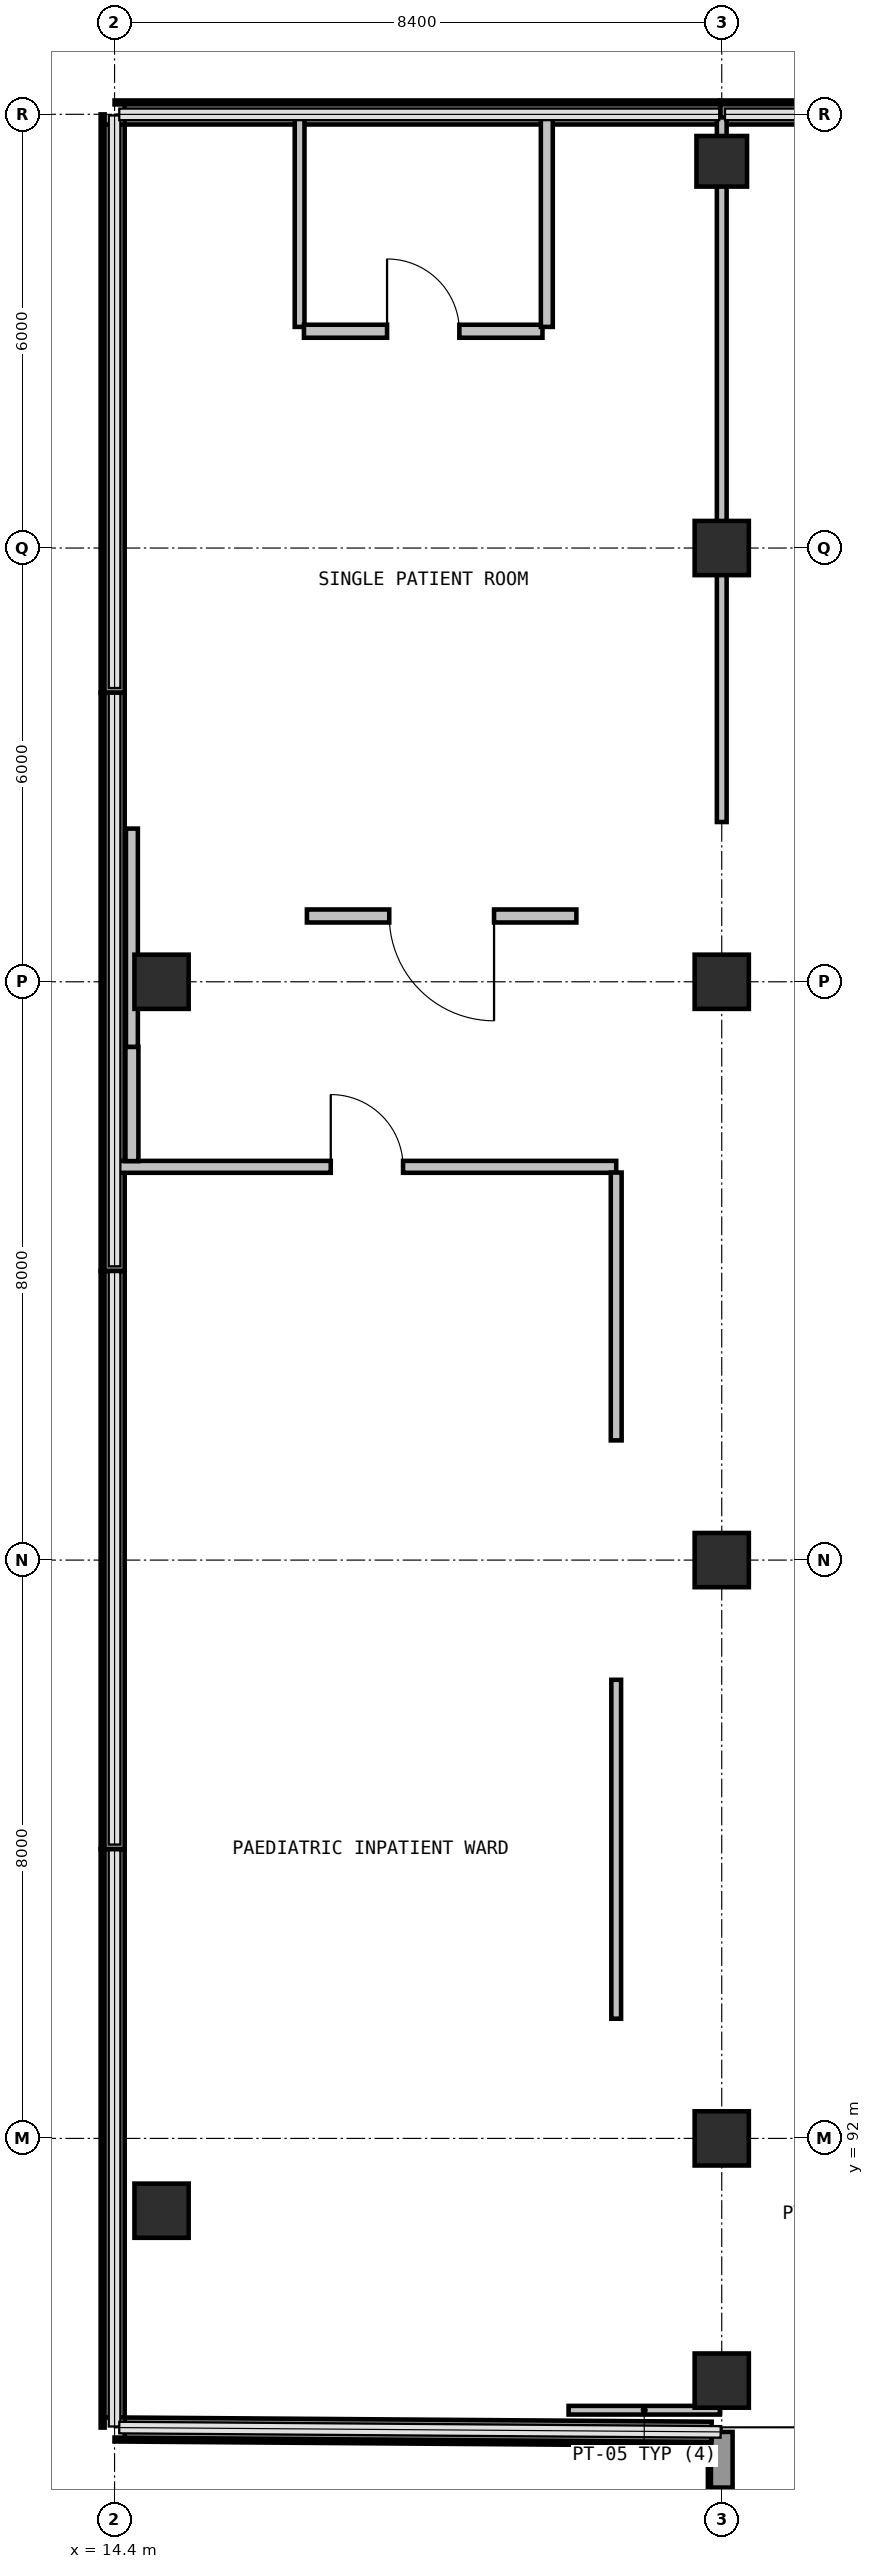
"""IFC4 building model, lengths in metres.
Left out: names, types, materials, properties, quantities, classifications, styles, units other than length and angle.
Written with IfcOpenShell. Run it as: python <this file> out.ifc"""

import sys

from ifc_helpers import new_model, si_unit, direction, frame, frame_2d, origin, origin_2d, place, context, subcontext, project, spatial, rectangle, extrude, element, fill, save


model = new_model("IFC4")
c1 = context("Model", 3, precision=1e-05, world=origin(), true_north=direction((0.0, 1.0)))
c2 = subcontext(c1, "Body", "Model", "MODEL_VIEW")
j1 = project(units=[si_unit("LENGTHUNIT", "METRE"), si_unit("PLANEANGLEUNIT", "RADIAN")], contexts=[c1])
p1 = place(None, origin())
s1 = spatial("IfcSite", under=j1, at=p1, CompositionType="ELEMENT")
p2 = place(p1, origin())
s2 = spatial("IfcBuilding", under=s1, at=p2, CompositionType="ELEMENT")
p3 = place(p2, frame((0.0, 0.0, 19.2)))
s3 = spatial("IfcBuildingStorey", under=s2, at=p3, CompositionType="ELEMENT", Elevation=19.2)
for number, where, z_axis, x_axis in (
    (1, (15.05, 91.0, 0.0), (0.0, 0.0, 1.0), (1.0, 0.0, 0.0)),
    (2, (15.05, 108.0, 0.0), (0.0, 0.0, 1.0), (1.0, 0.0, 0.0)),
):
    element("IfcColumn", number, at=place(p3, frame(where, z_axis=z_axis, x_axis=x_axis)), inside=s3, PredefinedType="COLUMN", context=c2, shape_type="SweptSolid", body=[
        extrude(rectangle(XDim=0.75, YDim=0.75, at=origin_2d()), origin(), (0.0, 0.0, 1.0), 3.768),
    ])
for number, where, z_axis, x_axis in (
    (3, (22.8, 88.65, 0.0), (0.0, 0.0, 1.0), (1.0, 0.0, 0.0)),
    (4, (22.8, 92.0, 0.0), (0.0, 0.0, 1.0), (1.0, 0.0, 0.0)),
    (5, (22.8, 100.0, 0.0), (0.0, 0.0, 1.0), (1.0, 0.0, 0.0)),
    (6, (22.8, 108.0, 0.0), (0.0, 0.0, 1.0), (1.0, 0.0, 0.0)),
    (7, (22.8, 114.0, 0.0), (0.0, 0.0, 1.0), (1.0, 0.0, 0.0)),
):
    element("IfcColumn", number, at=place(p3, frame(where, z_axis=z_axis, x_axis=x_axis)), inside=s3, PredefinedType="COLUMN", context=c2, shape_type="SweptSolid", body=[
        extrude(rectangle(XDim=0.75, YDim=0.75, at=origin_2d()), origin(), (0.0, 0.0, 1.0), 3.77),
    ])
p4 = place(p3, frame((22.8, 119.35, 0.0), z_axis=(0.0, 0.0, 1.0), x_axis=(1.0, 0.0, 0.0)))
e8 = element("IfcColumn", 8, at=p4, inside=s3, PredefinedType="COLUMN", context=c2, shape_type="SweptSolid", body=[
    extrude(rectangle(XDim=0.7, YDim=0.7, at=origin_2d()), origin(), (0.0, 0.0, 1.0), 3.77),
])
p5 = place(p3, frame((14.4, 88.14, 0.0), z_axis=(0.0, 0.0, 1.0), x_axis=(0.0, 1.0, 0.0)))
e9 = element("IfcWall", 9, at=p5, inside=s3, PredefinedType="SOLIDWALL", context=c2, shape_type="SweptSolid", body=[
    extrude(rectangle(XDim=7.858, YDim=0.28, at=frame_2d((3.929, 0.0))), origin(), (0.0, 0.0, 1.0), 0.94),
])
p6 = place(p3, frame((14.4, 96.002, 0.0), z_axis=(0.0, 0.0, 1.0), x_axis=(0.0, 1.0, 0.0)))
e10 = element("IfcWall", 10, at=p6, inside=s3, PredefinedType="SOLIDWALL", context=c2, shape_type="SweptSolid", body=[
    extrude(rectangle(XDim=7.995, YDim=0.28, at=frame_2d((3.998, 0.0))), origin(), (0.0, 0.0, 1.0), 0.94),
])
p7 = place(p3, frame((14.4, 104.001, 0.0), z_axis=(0.0, 0.0, 1.0), x_axis=(0.0, 1.0, 0.0)))
e11 = element("IfcWall", 11, at=p7, inside=s3, PredefinedType="SOLIDWALL", context=c2, shape_type="SweptSolid", body=[
    extrude(rectangle(XDim=7.996, YDim=0.28, at=frame_2d((3.998, 0.0))), origin(), (0.0, 0.0, 1.0), 0.94),
])
p8 = place(p3, frame((14.4, 112.001, 0.0), z_axis=(0.0, 0.0, 1.0), x_axis=(0.0, 1.0, 0.0)))
e12 = element("IfcWall", 12, at=p8, inside=s3, PredefinedType="SOLIDWALL", context=c2, shape_type="SweptSolid", body=[
    extrude(rectangle(XDim=7.858, YDim=0.28, at=frame_2d((3.929, 0.0))), origin(), (0.0, 0.0, 1.0), 0.94),
])
p9 = place(p3, frame((14.54, 119.999, 0.0), z_axis=(0.0, 0.0, 1.0), x_axis=(1.0, 0.0, 0.0)))
e13 = element("IfcWall", 13, at=p9, inside=s3, PredefinedType="SOLIDWALL", context=c2, shape_type="SweptSolid", body=[
    extrude(rectangle(XDim=8.238, YDim=0.28, at=frame_2d((4.119, 0.0))), origin(), (0.0, 0.0, 1.0), 0.94),
])
p10 = place(p3, frame((22.782, 119.999, 0.0), z_axis=(0.0, 0.0, 1.0), x_axis=(1.0, 0.0, 0.0)))
e14 = element("IfcWall", 14, at=p10, inside=s3, PredefinedType="SOLIDWALL", context=c2, shape_type="SweptSolid", body=[
    extrude(rectangle(XDim=8.376, YDim=0.28, at=frame_2d((4.188, 0.0))), origin(), (0.0, 0.0, 1.0), 0.94),
])
p11 = place(p3, frame((22.801, 84.0, 0.0), z_axis=(0.0, 0.0, 1.0), x_axis=(-0.000247862181, 0.999999969282, 0.0)))
e15 = element("IfcWall", 15, at=p11, inside=s3, PredefinedType="SOLIDWALL", context=c2, shape_type="SweptSolid", body=[
    extrude(rectangle(XDim=3.94, YDim=0.3, at=frame_2d((1.97, 0.0))), origin(), (0.0, 0.0, 1.0), 3.77),
])
p12 = place(p11, frame((0.77, 0.0, 0.96)))
e16 = element("IfcOpeningElement", 16, at=p12, cuts=e15, PredefinedType="OPENING", context=c2, shape_type="SweptSolid", body=[
    extrude(rectangle(XDim=2.4, YDim=1.5, at=frame_2d((1.2, 0.75))), frame((0.0, 0.16, 0.0), z_axis=(0.0, -1.0, 0.0), x_axis=(1.0, 0.0, 0.0)), (0.0, 0.0, 1.0), 0.32),
])
p13 = place(p3, frame((22.66, 87.941, 0.0), z_axis=(0.0, 0.0, 1.0), x_axis=(-0.999974397117, 0.007155774573, 0.0)))
e17 = element("IfcWall", 17, at=p13, inside=s3, PredefinedType="SOLIDWALL", context=c2, shape_type="SweptSolid", body=[
    extrude(rectangle(XDim=8.12, YDim=0.28, at=frame_2d((4.06, 0.0))), origin(), (0.0, 0.0, 1.0), 0.94),
])
p14 = place(p3, frame((14.442, 105.44, 0.0), z_axis=(0.0, 0.0, 1.0), x_axis=(1.0, 0.0, 0.0)))
e18 = element("IfcWall", 18, at=p14, inside=s3, PredefinedType="PARTITIONING", context=c2, shape_type="SweptSolid", body=[
    extrude(rectangle(XDim=6.898, YDim=0.165, at=frame_2d((3.449, 0.0))), origin(), (0.0, 0.0, 1.0), 3.77),
])
p15 = place(p14, frame((2.949, 0.0, 0.0)))
e19 = element("IfcOpeningElement", 19, at=p15, cuts=e18, PredefinedType="OPENING", context=c2, shape_type="SweptSolid", body=[
    extrude(rectangle(XDim=1.0, YDim=2.15, at=frame_2d((0.5, 1.075))), frame((0.0, 0.093, 0.0), z_axis=(0.0, -1.0, 0.0), x_axis=(1.0, 0.0, 0.0)), (0.0, 0.0, 1.0), 0.185),
])
p16 = place(p3, frame((21.34, 105.361, 0.0), z_axis=(0.0, 0.0, 1.0), x_axis=(0.0, -1.0, 0.0)))
e20 = element("IfcWall", 20, at=p16, inside=s3, PredefinedType="PARTITIONING", context=c2, shape_type="SweptSolid", body=[
    extrude(rectangle(XDim=3.705, YDim=0.15, at=frame_2d((1.853, 0.0))), origin(), (0.0, 0.0, 1.0), 3.77),
])
p17 = place(p3, frame((21.34, 98.344, 0.0), z_axis=(0.0, 0.0, 1.0), x_axis=(0.0, -1.0, 0.0)))
e21 = element("IfcWall", 21, at=p17, inside=s3, PredefinedType="PARTITIONING", context=c2, shape_type="SweptSolid", body=[
    extrude(rectangle(XDim=4.688, YDim=0.135, at=frame_2d((2.344, 0.0))), origin(), (0.0, 0.0, 1.0), 3.77),
])
p18 = place(p3, frame((20.681, 88.24, 0.0), z_axis=(0.0, 0.0, 1.0), x_axis=(1.0, 0.0, 0.0)))
e22 = element("IfcWall", 22, at=p18, inside=s3, PredefinedType="PARTITIONING", context=c2, shape_type="SweptSolid", body=[
    extrude(rectangle(XDim=2.093, YDim=0.12, at=frame_2d((1.046, 0.0))), origin(), (0.0, 0.0, 1.0), 3.77),
])
p19 = place(p3, frame((14.64, 107.1, 0.0), z_axis=(0.0, 0.0, 1.0), x_axis=(0.0, -1.0, 0.0)))
e23 = element("IfcWall", 23, at=p19, inside=s3, PredefinedType="PARTITIONING", context=c2, shape_type="SweptSolid", body=[
    extrude(rectangle(XDim=1.581, YDim=0.18, at=frame_2d((0.791, 0.0))), origin(), (0.0, 0.0, 1.0), 3.77),
])
p20 = place(p3, frame((20.789, 108.91, 0.0), z_axis=(0.0, 0.0, 1.0), x_axis=(-1.0, 0.0, 0.0)))
e24 = element("IfcWall", 24, at=p20, inside=s3, PredefinedType="PARTITIONING", context=c2, shape_type="SweptSolid", body=[
    extrude(rectangle(XDim=3.728, YDim=0.18, at=frame_2d((1.864, 0.0))), origin(), (0.0, 0.0, 1.0), 3.77),
])
p21 = place(p20, frame((1.139, 0.0, 0.0)))
e25 = element("IfcOpeningElement", 25, at=p21, cuts=e24, PredefinedType="OPENING", context=c2, shape_type="SweptSolid", body=[
    extrude(rectangle(XDim=1.45, YDim=2.15, at=frame_2d((0.725, 1.075))), frame((0.0, 0.1, 0.0), z_axis=(0.0, -1.0, 0.0), x_axis=(1.0, 0.0, 0.0)), (0.0, 0.0, 1.0), 0.2),
])
p22 = place(p3, frame((14.64, 110.119, 0.0), z_axis=(0.0, 0.0, 1.0), x_axis=(0.0, -1.0, 0.0)))
e26 = element("IfcWall", 26, at=p22, inside=s3, PredefinedType="PARTITIONING", context=c2, shape_type="SweptSolid", body=[
    extrude(rectangle(XDim=3.019, YDim=0.165, at=frame_2d((1.509, 0.0))), origin(), (0.0, 0.0, 1.0), 3.77),
])
p23 = place(p3, frame((16.96, 119.957, 0.0), z_axis=(0.0, 0.0, 1.0), x_axis=(0.0, -1.0, 0.0)))
e27 = element("IfcWall", 27, at=p23, inside=s3, PredefinedType="PARTITIONING", context=c2, shape_type="SweptSolid", body=[
    extrude(rectangle(XDim=2.898, YDim=0.135, at=frame_2d((1.449, 0.0))), origin(), (0.0, 0.0, 1.0), 3.77),
])
p24 = place(p3, frame((17.02, 116.999, 0.0), z_axis=(0.0, 0.0, 1.0), x_axis=(1.0, 0.0, 0.0)))
e28 = element("IfcWall", 28, at=p24, inside=s3, PredefinedType="PARTITIONING", context=c2, shape_type="SweptSolid", body=[
    extrude(rectangle(XDim=3.3, YDim=0.18, at=frame_2d((1.65, 0.0))), origin(), (0.0, 0.0, 1.0), 3.77),
])
p25 = place(p24, frame((1.15, 0.0, 0.0)))
e29 = element("IfcOpeningElement", 29, at=p25, cuts=e28, PredefinedType="OPENING", context=c2, shape_type="SweptSolid", body=[
    extrude(rectangle(XDim=1.0, YDim=2.15, at=frame_2d((0.5, 1.075))), frame((0.0, 0.1, 0.0), z_axis=(0.0, -1.0, 0.0), x_axis=(1.0, 0.0, 0.0)), (0.0, 0.0, 1.0), 0.2),
])
p26 = place(p3, frame((20.38, 117.059, 0.0), z_axis=(0.0, 0.0, 1.0), x_axis=(0.0, 1.0, 0.0)))
e30 = element("IfcWall", 30, at=p26, inside=s3, PredefinedType="PARTITIONING", context=c2, shape_type="SweptSolid", body=[
    extrude(rectangle(XDim=2.898, YDim=0.165, at=frame_2d((1.449, 0.0))), origin(), (0.0, 0.0, 1.0), 3.77),
])
p27 = place(p3, frame((22.8, 119.957, 0.0), z_axis=(0.0, 0.0, 1.0), x_axis=(0.0, -1.0, 0.0)))
e31 = element("IfcWall", 31, at=p27, inside=s3, PredefinedType="PARTITIONING", context=c2, shape_type="SweptSolid", body=[
    extrude(rectangle(XDim=9.747, YDim=0.135, at=frame_2d((4.874, 0.0))), origin(), (0.0, 0.0, 1.0), 3.77),
])
p28 = place(p12, origin())
e32 = element("IfcWindow", 32, at=p28, inside=s3, PartitioningType="SINGLE_PANEL", PredefinedType="WINDOW", context=c2, shape_type="SweptSolid", body=[
    extrude(rectangle(XDim=2.4, YDim=1.5, at=frame_2d((1.2, 0.75))), frame((0.0, 0.03, 0.0), z_axis=(0.0, -1.0, 0.0), x_axis=(1.0, 0.0, 0.0)), (0.0, 0.0, 1.0), 0.06),
])
fill(e16, e32)
p29 = place(p15, origin())
e33 = element("IfcDoor", 33, at=p29, inside=s3, OperationType="SINGLE_SWING_LEFT", PredefinedType="DOOR", context=c2, shape_type="SweptSolid", body=[
    extrude(rectangle(XDim=1.0, YDim=2.15, at=frame_2d((0.5, 1.075))), frame((0.0, 0.025, 0.0), z_axis=(0.0, -1.0, 0.0), x_axis=(1.0, 0.0, 0.0)), (0.0, 0.0, 1.0), 0.05),
])
fill(e19, e33)
p30 = place(p21, origin())
e34 = element("IfcDoor", 34, at=p30, inside=s3, OperationType="SINGLE_SWING_RIGHT", PredefinedType="DOOR", context=c2, shape_type="SweptSolid", body=[
    extrude(rectangle(XDim=1.45, YDim=2.15, at=frame_2d((0.725, 1.075))), frame((0.0, 0.025, 0.0), z_axis=(0.0, -1.0, 0.0), x_axis=(1.0, 0.0, 0.0)), (0.0, 0.0, 1.0), 0.05),
])
fill(e25, e34)
p31 = place(p25, origin())
e35 = element("IfcDoor", 35, at=p31, inside=s3, OperationType="SINGLE_SWING_LEFT", PredefinedType="DOOR", context=c2, shape_type="SweptSolid", body=[
    extrude(rectangle(XDim=1.0, YDim=2.15, at=frame_2d((0.5, 1.075))), frame((0.0, 0.025, 0.0), z_axis=(0.0, -1.0, 0.0), x_axis=(1.0, 0.0, 0.0)), (0.0, 0.0, 1.0), 0.05),
])
fill(e29, e35)
save(model, sys.argv[1])
